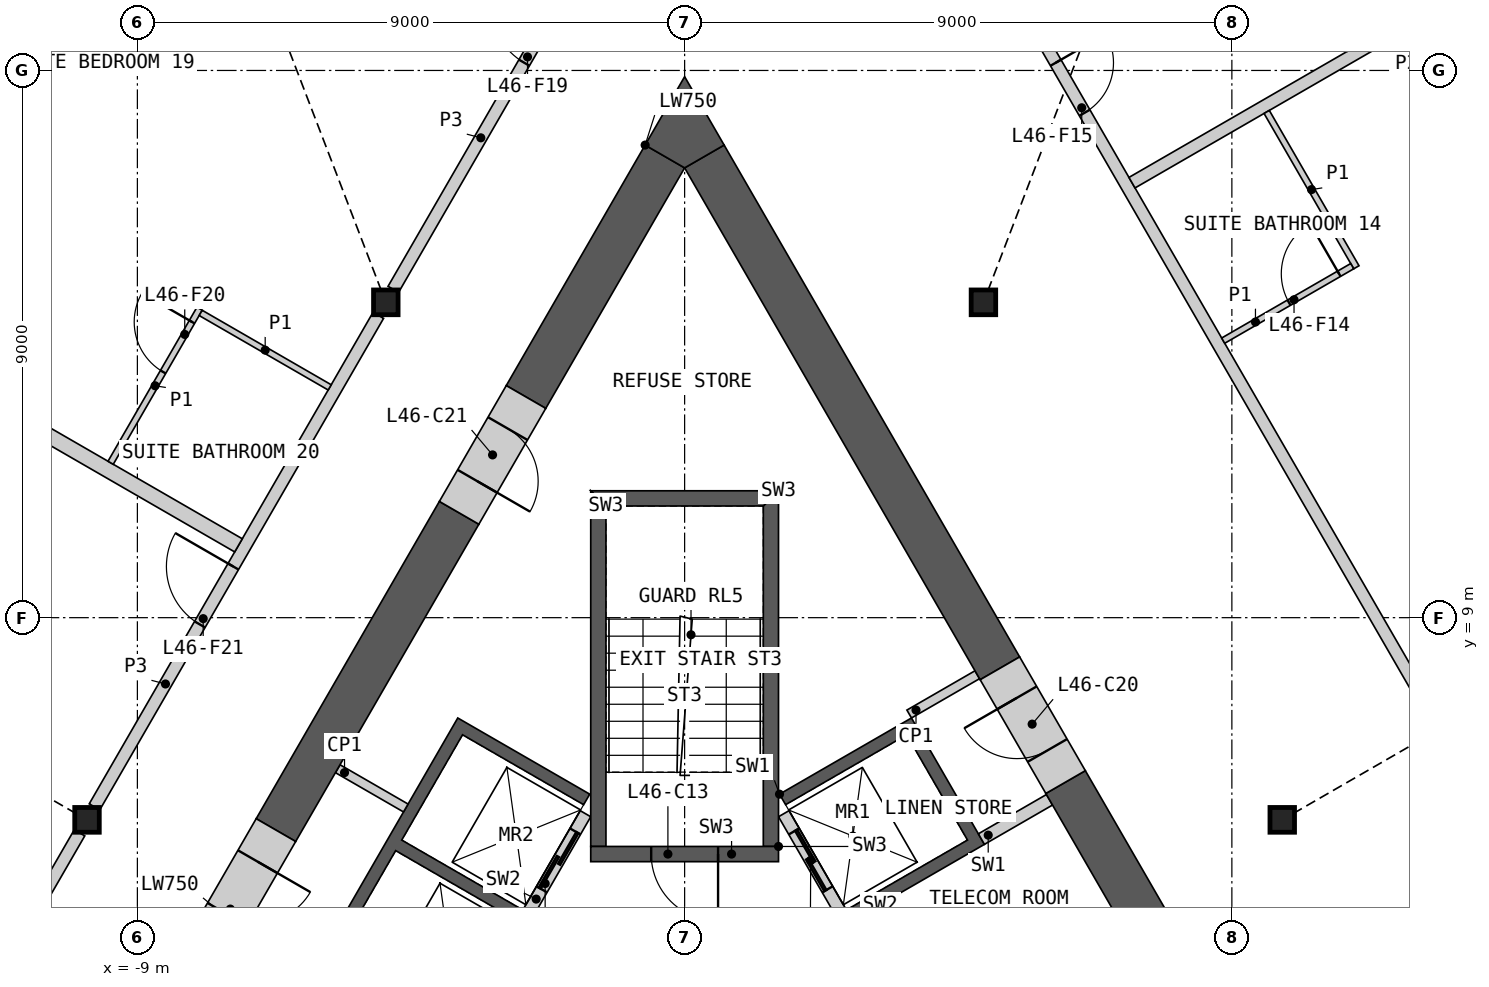
"""IFC4 building model, lengths in metres.
Left out: names, types, materials, properties, quantities, classifications, styles, units other than length and angle.
Written with IfcOpenShell. Run it as: python <this file> out.ifc"""

import sys

from ifc_helpers import new_model, si_unit, direction, frame, frame_2d, origin, origin_2d, place, context, subcontext, project, spatial, polyline, rectangle, i_section, outline, extrude, element, fill, save


model = new_model("IFC4")
c1 = context("Model", 3, precision=1e-05, world=origin(), true_north=direction((0.0, 1.0)))
c2 = subcontext(c1, "Body", "Model", "MODEL_VIEW")
j1 = project(units=[si_unit("LENGTHUNIT", "METRE"), si_unit("PLANEANGLEUNIT", "RADIAN")], contexts=[c1])
p1 = place(None, origin())
s1 = spatial("IfcSite", under=j1, at=p1, CompositionType="ELEMENT")
p2 = place(p1, origin())
s2 = spatial("IfcBuilding", under=s1, at=p2, CompositionType="ELEMENT")
p3 = place(p2, frame((0.0, 0.0, 208.8)))
s3 = spatial("IfcBuildingStorey", under=s2, at=p3, CompositionType="ELEMENT", Elevation=208.8)
for number, where, z_axis, x_axis in (
    (1, (-4.914, 14.186, 0.0), (0.0, 0.0, 1.0), (1.0, 0.0, 0.0)),
    (2, (-9.828, 5.675, 0.0), (0.0, 0.0, 1.0), (1.0, 0.0, 0.0)),
    (3, (9.828, 5.675, 0.0), (0.0, 0.0, 1.0), (1.0, 0.0, 0.0)),
    (4, (4.914, 14.186, 0.0), (0.0, 0.0, 1.0), (1.0, 0.0, 0.0)),
):
    element("IfcColumn", number, at=place(p3, frame(where, z_axis=z_axis, x_axis=x_axis)), inside=s3, PredefinedType="COLUMN", context=c2, shape_type="SweptSolid", body=[
        extrude(i_section(OverallWidth=0.404, OverallDepth=0.407, WebThickness=0.027, FlangeThickness=0.044, at=origin_2d()), origin(), (0.0, 0.0, 1.0), 3.6),
    ])
p4 = place(p3, origin())
e5 = element("IfcWall", 5, at=p4, inside=s3, PredefinedType="SHEAR", context=c2, shape_type="SweptSolid", body=[
    extrude(outline(polyline([(1.561, 6.097), (3.731, 7.35), (4.931, 5.272), (2.76, 4.019), (2.66, 4.192), (4.652, 5.342), (3.652, 7.074), (1.66, 5.924), (1.561, 6.097)])), origin(), (0.0, 0.0, 1.0), 3.25),
])
p5 = place(p3, frame((5.817, -1.476, 0.0), z_axis=(0.0, 0.0, 1.0), x_axis=(-0.500002616675, 0.866023893041, 0.0)))
e6 = element("IfcWall", 6, at=p5, inside=s3, PredefinedType="SOLIDWALL", context=c2, shape_type="SweptSolid", body=[
    extrude(rectangle(XDim=8.373, YDim=0.2, at=frame_2d((4.187, 0.0))), origin(), (0.0, 0.0, 1.0), 3.25),
])
p6 = place(p5, frame((1.537, 0.0, 0.0)))
e7 = element("IfcOpeningElement", 7, at=p6, cuts=e6, PredefinedType="OPENING", context=c2, shape_type="SweptSolid", body=[
    extrude(rectangle(XDim=0.9, YDim=2.1, at=frame_2d((0.45, 1.05))), frame((0.0, 0.11, 0.0), z_axis=(0.0, -1.0, 0.0), x_axis=(1.0, 0.0, 0.0)), (0.0, 0.0, 1.0), 0.22),
])
p7 = place(p5, frame((4.837, 0.0, 0.0)))
e8 = element("IfcOpeningElement", 8, at=p7, cuts=e6, PredefinedType="OPENING", context=c2, shape_type="SweptSolid", body=[
    extrude(rectangle(XDim=0.9, YDim=2.1, at=frame_2d((0.45, 1.05))), frame((0.0, 0.11, 0.0), z_axis=(0.0, -1.0, 0.0), x_axis=(1.0, 0.0, 0.0)), (0.0, 0.0, 1.0), 0.22),
])
p8 = place(p5, frame((6.937, 0.0, 0.0)))
e9 = element("IfcOpeningElement", 9, at=p8, cuts=e6, PredefinedType="OPENING", context=c2, shape_type="SweptSolid", body=[
    extrude(rectangle(XDim=1.1, YDim=2.1, at=frame_2d((0.55, 1.05))), frame((0.0, 0.11, 0.0), z_axis=(0.0, -1.0, 0.0), x_axis=(1.0, 0.0, 0.0)), (0.0, 0.0, 1.0), 0.22),
])
p9 = place(p3, frame((4.881, 5.358, 0.0), z_axis=(0.0, 0.0, 1.0), x_axis=(0.866084958089, 0.499896834728, 0.0)))
e10 = element("IfcWall", 10, at=p9, inside=s3, PredefinedType="SHEAR", context=c2, shape_type="SweptSolid", body=[
    extrude(rectangle(XDim=1.293, YDim=0.2, at=frame_2d((0.646, 0.0))), origin(), (0.0, 0.0, 1.0), 3.25),
])
p10 = place(p3, origin())
e11 = element("IfcWall", 11, at=p10, inside=s3, PredefinedType="SHEAR", context=c2, shape_type="SweptSolid", body=[
    extrude(outline(polyline([(-4.96, 0.208), (-7.131, 1.461), (-3.731, 7.35), (-1.561, 6.097), (-1.66, 5.924), (-3.652, 7.074), (-4.652, 5.342), (-2.66, 4.192), (-2.76, 4.019), (-4.752, 5.169), (-5.752, 3.437), (-3.76, 2.287), (-3.861, 2.113), (-5.852, 3.263), (-6.852, 1.531), (-4.861, 0.381), (-4.96, 0.208)])), origin(), (0.0, 0.0, 1.0), 3.25),
])
p11 = place(p3, frame((-1.631, 5.776, 0.0), z_axis=(0.0, 0.0, 1.0), x_axis=(-0.499992876559, -0.866029516466, 0.0)))
e12 = element("IfcWall", 12, at=p11, inside=s3, PredefinedType="SOLIDWALL", context=c2, shape_type="SweptSolid", body=[
    extrude(rectangle(XDim=6.486, YDim=0.2, at=frame_2d((3.243, 0.0))), origin(), (0.0, 0.0, 1.0), 3.25),
])
p12 = place(p11, frame((0.337, 0.0, 0.0)))
e13 = element("IfcOpeningElement", 13, at=p12, cuts=e12, PredefinedType="OPENING", context=c2, shape_type="SweptSolid", body=[
    extrude(rectangle(XDim=1.1, YDim=2.1, at=frame_2d((0.55, 1.05))), frame((0.0, 0.11, 0.0), z_axis=(0.0, -1.0, 0.0), x_axis=(1.0, 0.0, 0.0)), (0.0, 0.0, 1.0), 0.22),
])
p13 = place(p11, frame((2.537, 0.0, 0.0)))
e14 = element("IfcOpeningElement", 14, at=p13, cuts=e12, PredefinedType="OPENING", context=c2, shape_type="SweptSolid", body=[
    extrude(rectangle(XDim=1.1, YDim=2.1, at=frame_2d((0.55, 1.05))), frame((0.0, 0.11, 0.0), z_axis=(0.0, -1.0, 0.0), x_axis=(1.0, 0.0, 0.0)), (0.0, 0.0, 1.0), 0.22),
])
p14 = place(p3, origin())
e15 = element("IfcWall", 15, at=p14, inside=s3, PredefinedType="SHEAR", context=c2, shape_type="SweptSolid", body=[
    extrude(outline(polyline([(1.544, 5.237), (1.544, 11.087), (1.294, 10.837), (1.294, 5.237), (1.544, 5.237)])), origin(), (0.0, 0.0, 1.0), 3.25),
])
p15 = place(p3, origin())
e16 = element("IfcWall", 16, at=p15, inside=s3, PredefinedType="SHEAR", context=c2, shape_type="SweptSolid", body=[
    extrude(outline(polyline([(1.544, 11.087), (-1.544, 11.087), (-1.294, 10.837), (1.294, 10.837), (1.544, 11.087)])), origin(), (0.0, 0.0, 1.0), 3.25),
])
p16 = place(p3, origin())
e17 = element("IfcWall", 17, at=p16, inside=s3, PredefinedType="SHEAR", context=c2, shape_type="SweptSolid", body=[
    extrude(outline(polyline([(-1.294, 10.837), (-1.544, 11.087), (-1.544, 5.237), (-1.294, 5.237), (-1.294, 10.837)])), origin(), (0.0, 0.0, 1.0), 3.25),
])
p17 = place(p3, frame((1.544, 5.112, 0.0), z_axis=(0.0, 0.0, 1.0), x_axis=(-1.0, 0.0, 0.0)))
e18 = element("IfcWall", 18, at=p17, inside=s3, PredefinedType="SHEAR", context=c2, shape_type="SweptSolid", body=[
    extrude(rectangle(XDim=3.088, YDim=0.25, at=frame_2d((1.544, 0.0))), origin(), (0.0, 0.0, 1.0), 3.25),
])
p18 = place(p17, frame((0.994, 0.0, 0.0)))
e19 = element("IfcOpeningElement", 19, at=p18, cuts=e18, PredefinedType="OPENING", context=c2, shape_type="SweptSolid", body=[
    extrude(rectangle(XDim=1.1, YDim=2.1, at=frame_2d((0.55, 1.05))), frame((0.0, 0.135, 0.0), z_axis=(0.0, -1.0, 0.0), x_axis=(1.0, 0.0, 0.0)), (0.0, 0.0, 1.0), 0.27),
])
for number, where, z_axis, x_axis in (
    (20, (3.693, 7.415, 0.0), (0.0, 0.0, 1.0), (0.866, 0.5, 0.0)),
    (21, (-5.705, 6.516, 0.0), (0.0, 0.0, 1.0), (0.866, -0.5, 0.0)),
):
    element("IfcWall", number, at=place(p3, frame(where, z_axis=z_axis, x_axis=x_axis)), inside=s3, PredefinedType="PARTITIONING", context=c2, shape_type="SweptSolid", body=[
        extrude(rectangle(XDim=1.293, YDim=0.15, at=frame_2d((0.646, 0.0))), origin(), (0.0, 0.0, 1.0), 3.25),
    ])
p19 = place(p3, frame((5.185, 8.167, 0.0), z_axis=(0.0, 0.0, 1.0), x_axis=(-0.500004344816, 0.866022895289, 0.0)))
e22 = element("IfcWall", 22, at=p19, inside=s3, PredefinedType="SHEAR", context=c2, shape_type="SweptSolid", body=[
    extrude(rectangle(XDim=9.721, YDim=0.75, at=frame_2d((4.861, 0.0))), origin(), (0.0, 0.0, 1.0), 3.25),
])
p20 = place(p3, frame((8.025, 3.248, 0.0), z_axis=(0.0, 0.0, 1.0), x_axis=(-0.499958618571, 0.866049294045, 0.0)))
e23 = element("IfcWall", 23, at=p20, inside=s3, PredefinedType="SHEAR", context=c2, shape_type="SweptSolid", body=[
    extrude(rectangle(XDim=3.52, YDim=0.75, at=frame_2d((1.76, 0.0))), origin(), (0.0, 0.0, 1.0), 3.25),
])
p21 = place(p3, frame((-3.708, 10.724, 0.0), z_axis=(0.0, 0.0, 1.0), x_axis=(-0.500021737671, -0.866012853171, 0.0)))
e24 = element("IfcWall", 24, at=p21, inside=s3, PredefinedType="SHEAR", context=c2, shape_type="SweptSolid", body=[
    extrude(rectangle(XDim=6.026, YDim=0.75, at=frame_2d((3.013, 0.0))), origin(), (0.0, 0.0, 1.0), 3.25),
])
p22 = place(p3, frame((-0.325, 16.585, 0.0), z_axis=(0.0, 0.0, 1.0), x_axis=(-0.499984617099, -0.866034284924, 0.0)))
e25 = element("IfcWall", 25, at=p22, inside=s3, PredefinedType="SHEAR", context=c2, shape_type="SweptSolid", body=[
    extrude(rectangle(XDim=4.568, YDim=0.75, at=frame_2d((2.284, 0.0))), origin(), (0.0, 0.0, 1.0), 3.25),
])
p23 = place(p3, origin())
e26 = element("IfcWall", 26, at=p23, inside=s3, PredefinedType="SHEAR", context=c2, shape_type="SweptSolid", body=[
    extrude(outline(polyline([(-0.649, 16.773), (0.0, 17.898), (0.649, 16.773), (0.0, 16.398), (-0.649, 16.773)])), origin(), (0.0, 0.0, 1.0), 3.25),
])
p24 = place(p3, frame((-6.721, 5.506, 0.0), z_axis=(0.0, 0.0, 1.0), x_axis=(-0.499946605688, -0.86605622881, 0.0)))
e27 = element("IfcWall", 27, at=p24, inside=s3, PredefinedType="SHEAR", context=c2, shape_type="SweptSolid", body=[
    extrude(rectangle(XDim=2.2, YDim=0.75, at=frame_2d((1.1, 0.0))), origin(), (0.0, 0.0, 1.0), 3.25),
])
p25 = place(p24, frame((0.6, 0.0, 0.0)))
e28 = element("IfcOpeningElement", 28, at=p25, cuts=e27, PredefinedType="OPENING", context=c2, shape_type="SweptSolid", body=[
    extrude(rectangle(XDim=1.0, YDim=2.1, at=frame_2d((0.5, 1.05))), frame((0.0, 0.385, 0.0), z_axis=(0.0, -1.0, 0.0), x_axis=(1.0, 0.0, 0.0)), (0.0, 0.0, 1.0), 0.77),
])
p26 = place(p3, frame((6.265, 6.296, 0.0), z_axis=(0.0, 0.0, 1.0), x_axis=(-0.500029011134, 0.866008653551, 0.0)))
e29 = element("IfcWall", 29, at=p26, inside=s3, PredefinedType="SHEAR", context=c2, shape_type="SweptSolid", body=[
    extrude(rectangle(XDim=2.16, YDim=0.75, at=frame_2d((1.08, 0.0))), origin(), (0.0, 0.0, 1.0), 3.25),
])
p27 = place(p26, frame((0.6, 0.0, 0.0)))
e30 = element("IfcOpeningElement", 30, at=p27, cuts=e29, PredefinedType="OPENING", context=c2, shape_type="SweptSolid", body=[
    extrude(rectangle(XDim=1.0, YDim=2.1, at=frame_2d((0.5, 1.05))), frame((0.0, 0.385, 0.0), z_axis=(0.0, -1.0, 0.0), x_axis=(1.0, 0.0, 0.0)), (0.0, 0.0, 1.0), 0.77),
])
p28 = place(p3, frame((-2.609, 12.629, 0.0), z_axis=(0.0, 0.0, 1.0), x_axis=(-0.500077893725, -0.86598042715, 0.0)))
e31 = element("IfcWall", 31, at=p28, inside=s3, PredefinedType="SHEAR", context=c2, shape_type="SweptSolid", body=[
    extrude(rectangle(XDim=2.2, YDim=0.75, at=frame_2d((1.1, 0.0))), origin(), (0.0, 0.0, 1.0), 3.25),
])
p29 = place(p28, frame((0.6, 0.0, 0.0)))
e32 = element("IfcOpeningElement", 32, at=p29, cuts=e31, PredefinedType="OPENING", context=c2, shape_type="SweptSolid", body=[
    extrude(rectangle(XDim=1.0, YDim=2.1, at=frame_2d((0.5, 1.05))), frame((0.0, 0.385, 0.0), z_axis=(0.0, -1.0, 0.0), x_axis=(1.0, 0.0, 0.0)), (0.0, 0.0, 1.0), 0.77),
])
p30 = place(p3, frame((5.377, 19.385, 0.0), z_axis=(0.0, 0.0, 1.0), x_axis=(0.500000757641, -0.86602496636, 0.0)))
e33 = element("IfcWall", 33, at=p30, inside=s3, PredefinedType="PARTITIONING", context=c2, shape_type="SweptSolid", body=[
    extrude(rectangle(XDim=28.198, YDim=0.2, at=frame_2d((14.099, 0.0))), origin(), (0.0, 0.0, 1.0), 3.25),
])
p31 = place(p30, frame((25.345, 0.0, 0.0)))
e34 = element("IfcOpeningElement", 34, at=p31, cuts=e33, PredefinedType="OPENING", context=c2, shape_type="SweptSolid", body=[
    extrude(rectangle(XDim=1.8, YDim=2.1, at=frame_2d((0.9, 1.05))), frame((0.0, 0.11, 0.0), z_axis=(0.0, -1.0, 0.0), x_axis=(1.0, 0.0, 0.0)), (0.0, 0.0, 1.0), 0.22),
])
p32 = place(p30, frame((19.621, 0.0, 0.0)))
e35 = element("IfcOpeningElement", 35, at=p32, cuts=e33, PredefinedType="OPENING", context=c2, shape_type="SweptSolid", body=[
    extrude(rectangle(XDim=1.0, YDim=2.1, at=frame_2d((0.5, 1.05))), frame((0.0, 0.11, 0.0), z_axis=(0.0, -1.0, 0.0), x_axis=(1.0, 0.0, 0.0)), (0.0, 0.0, 1.0), 0.22),
])
p33 = place(p30, frame((16.409, 0.0, 0.0)))
e36 = element("IfcOpeningElement", 36, at=p33, cuts=e33, PredefinedType="OPENING", context=c2, shape_type="SweptSolid", body=[
    extrude(rectangle(XDim=1.1, YDim=2.1, at=frame_2d((0.55, 1.05))), frame((0.0, 0.11, 0.0), z_axis=(0.0, -1.0, 0.0), x_axis=(1.0, 0.0, 0.0)), (0.0, 0.0, 1.0), 0.22),
])
p34 = place(p30, frame((1.452, 0.0, 0.0)))
e37 = element("IfcOpeningElement", 37, at=p34, cuts=e33, PredefinedType="OPENING", context=c2, shape_type="SweptSolid", body=[
    extrude(rectangle(XDim=0.95, YDim=2.1, at=frame_2d((0.475, 1.05))), frame((0.0, 0.11, 0.0), z_axis=(0.0, -1.0, 0.0), x_axis=(1.0, 0.0, 0.0)), (0.0, 0.0, 1.0), 0.22),
])
p35 = place(p3, frame((-9.705, 5.888, 0.0), z_axis=(0.0, 0.0, 1.0), x_axis=(0.50000393355, 0.866023132736, 0.0)))
e38 = element("IfcWall", 38, at=p35, inside=s3, PredefinedType="PARTITIONING", context=c2, shape_type="SweptSolid", body=[
    extrude(rectangle(XDim=9.335, YDim=0.2, at=frame_2d((4.667, 0.0))), origin(), (0.0, 0.0, 1.0), 3.25),
])
p36 = place(p35, frame((3.465, 0.0, 0.0)))
e39 = element("IfcOpeningElement", 39, at=p36, cuts=e38, PredefinedType="OPENING", context=c2, shape_type="SweptSolid", body=[
    extrude(rectangle(XDim=1.1, YDim=2.1, at=frame_2d((0.55, 1.05))), frame((0.0, 0.11, 0.0), z_axis=(0.0, -1.0, 0.0), x_axis=(1.0, 0.0, 0.0)), (0.0, 0.0, 1.0), 0.22),
])
p37 = place(p3, frame((-14.619, -2.624, 0.0), z_axis=(0.0, 0.0, 1.0), x_axis=(0.50000393355, 0.866023132736, 0.0)))
e40 = element("IfcWall", 40, at=p37, inside=s3, PredefinedType="PARTITIONING", context=c2, shape_type="SweptSolid", body=[
    extrude(rectangle(XDim=9.335, YDim=0.2, at=frame_2d((4.667, 0.0))), origin(), (0.0, 0.0, 1.0), 3.25),
])
p38 = place(p37, frame((3.062, 0.0, 0.0)))
e41 = element("IfcOpeningElement", 41, at=p38, cuts=e40, PredefinedType="OPENING", context=c2, shape_type="SweptSolid", body=[
    extrude(rectangle(XDim=1.0, YDim=2.1, at=frame_2d((0.5, 1.05))), frame((0.0, 0.11, 0.0), z_axis=(0.0, -1.0, 0.0), x_axis=(1.0, 0.0, 0.0)), (0.0, 0.0, 1.0), 0.22),
])
p39 = place(p3, frame((-14.39, 14.261, 0.0), z_axis=(0.0, 0.0, 1.0), x_axis=(0.86603182394, -0.4999888798, 0.0)))
e42 = element("IfcWall", 42, at=p39, inside=s3, PredefinedType="PARTITIONING", context=c2, shape_type="SweptSolid", body=[
    extrude(rectangle(XDim=8.144, YDim=0.25, at=frame_2d((4.072, 0.0))), origin(), (0.0, 0.0, 1.0), 2.404),
])
p40 = place(p3, frame((-4.791, 14.4, 0.0), z_axis=(0.0, 0.0, 1.0), x_axis=(0.50000762079, 0.866021003874, 0.0)))
e43 = element("IfcWall", 43, at=p40, inside=s3, PredefinedType="PARTITIONING", context=c2, shape_type="SweptSolid", body=[
    extrude(rectangle(XDim=5.756, YDim=0.2, at=frame_2d((2.878, 0.0))), origin(), (0.0, 0.0, 1.0), 3.25),
])
p41 = place(p40, frame((4.304, 0.0, 0.0)))
e44 = element("IfcOpeningElement", 44, at=p41, cuts=e43, PredefinedType="OPENING", context=c2, shape_type="SweptSolid", body=[
    extrude(rectangle(XDim=1.1, YDim=2.1, at=frame_2d((0.55, 1.05))), frame((0.0, 0.11, 0.0), z_axis=(0.0, -1.0, 0.0), x_axis=(1.0, 0.0, 0.0)), (0.0, 0.0, 1.0), 0.22),
])
p42 = place(p3, frame((7.357, 16.154, 0.0), z_axis=(0.0, 0.0, 1.0), x_axis=(0.866029004385, 0.499993763526, 0.0)))
e45 = element("IfcWall", 45, at=p42, inside=s3, PredefinedType="PARTITIONING", context=c2, shape_type="SweptSolid", body=[
    extrude(rectangle(XDim=9.789, YDim=0.2, at=frame_2d((4.895, 0.0))), origin(), (0.0, 0.0, 1.0), 2.404),
])
p43 = place(p3, frame((9.573, 17.318, 0.0), z_axis=(0.0, 0.0, 1.0), x_axis=(0.500037662692, -0.866003658127, 0.0)))
e46 = element("IfcWall", 46, at=p43, inside=s3, PredefinedType="PARTITIONING", context=c2, shape_type="SweptSolid", body=[
    extrude(rectangle(XDim=2.95, YDim=0.1, at=frame_2d((1.475, 0.0))), origin(), (0.0, 0.0, 1.0), 2.404),
])
p44 = place(p3, frame((-9.44, 11.548, 0.0), z_axis=(0.0, 0.0, 1.0), x_axis=(0.499963291492, 0.866046596414, 0.0)))
e47 = element("IfcWall", 47, at=p44, inside=s3, PredefinedType="PARTITIONING", context=c2, shape_type="SweptSolid", body=[
    extrude(rectangle(XDim=2.925, YDim=0.1, at=frame_2d((1.462, 0.0))), origin(), (0.0, 0.0, 1.0), 2.404),
])
p45 = place(p44, frame((1.725, 0.0, 0.0)))
e48 = element("IfcOpeningElement", 48, at=p45, cuts=e47, PredefinedType="OPENING", context=c2, shape_type="SweptSolid", body=[
    extrude(rectangle(XDim=0.95, YDim=2.1, at=frame_2d((0.475, 1.05))), frame((0.0, 0.06, 0.0), z_axis=(0.0, -1.0, 0.0), x_axis=(1.0, 0.0, 0.0)), (0.0, 0.0, 1.0), 0.12),
])
p46 = place(p3, frame((8.857, 13.556, 0.0), z_axis=(0.0, 0.0, 1.0), x_axis=(0.866014668023, 0.500018594424, 0.0)))
e49 = element("IfcWall", 49, at=p46, inside=s3, PredefinedType="PARTITIONING", context=c2, shape_type="SweptSolid", body=[
    extrude(rectangle(XDim=2.45, YDim=0.1, at=frame_2d((1.225, 0.0))), origin(), (0.0, 0.0, 1.0), 2.404),
])
p47 = place(p46, frame((1.25, 0.0, 0.0)))
e50 = element("IfcOpeningElement", 50, at=p47, cuts=e49, PredefinedType="OPENING", context=c2, shape_type="SweptSolid", body=[
    extrude(rectangle(XDim=0.95, YDim=2.1, at=frame_2d((0.475, 1.05))), frame((0.0, 0.06, 0.0), z_axis=(0.0, -1.0, 0.0), x_axis=(1.0, 0.0, 0.0)), (0.0, 0.0, 1.0), 0.12),
])
p48 = place(p3, frame((-7.959, 14.012, 0.0), z_axis=(0.0, 0.0, 1.0), x_axis=(0.866057815567, -0.499943856944, 0.0)))
e51 = element("IfcWall", 51, at=p48, inside=s3, PredefinedType="PARTITIONING", context=c2, shape_type="SweptSolid", body=[
    extrude(rectangle(XDim=2.45, YDim=0.1, at=frame_2d((1.225, 0.0))), origin(), (0.0, 0.0, 1.0), 2.404),
])
p49 = place(p8, origin())
e52 = element("IfcDoor", 52, at=p49, inside=s3, OperationType="SLIDING_TO_LEFT", PredefinedType="DOOR", context=c2, shape_type="SweptSolid", body=[
    extrude(rectangle(XDim=1.1, YDim=2.1, at=frame_2d((0.55, 1.05))), frame((0.0, 0.025, 0.0), z_axis=(0.0, -1.0, 0.0), x_axis=(1.0, 0.0, 0.0)), (0.0, 0.0, 1.0), 0.05),
])
fill(e9, e52)
p50 = place(p12, origin())
e53 = element("IfcDoor", 53, at=p50, inside=s3, OperationType="SLIDING_TO_LEFT", PredefinedType="DOOR", context=c2, shape_type="SweptSolid", body=[
    extrude(rectangle(XDim=1.1, YDim=2.1, at=frame_2d((0.55, 1.05))), frame((0.0, 0.025, 0.0), z_axis=(0.0, -1.0, 0.0), x_axis=(1.0, 0.0, 0.0)), (0.0, 0.0, 1.0), 0.05),
])
fill(e13, e53)
p51 = place(p18, origin())
e54 = element("IfcDoor", 54, at=p51, inside=s3, OperationType="SINGLE_SWING_LEFT", PredefinedType="DOOR", context=c2, shape_type="SweptSolid", body=[
    extrude(rectangle(XDim=1.1, YDim=2.1, at=frame_2d((0.55, 1.05))), frame((0.0, 0.025, 0.0), z_axis=(0.0, -1.0, 0.0), x_axis=(1.0, 0.0, 0.0)), (0.0, 0.0, 1.0), 0.05),
])
fill(e19, e54)
p52 = place(p25, origin())
e55 = element("IfcDoor", 55, at=p52, inside=s3, OperationType="SINGLE_SWING_LEFT", PredefinedType="DOOR", context=c2, shape_type="SweptSolid", body=[
    extrude(rectangle(XDim=1.0, YDim=2.1, at=frame_2d((0.5, 1.05))), frame((0.0, 0.13, 0.0), z_axis=(0.0, -1.0, 0.0), x_axis=(1.0, 0.0, 0.0)), (0.0, 0.0, 1.0), 0.05),
])
fill(e28, e55)
p53 = place(p27, origin())
e56 = element("IfcDoor", 56, at=p53, inside=s3, OperationType="SINGLE_SWING_RIGHT", PredefinedType="DOOR", context=c2, shape_type="SweptSolid", body=[
    extrude(rectangle(XDim=1.0, YDim=2.1, at=frame_2d((0.5, 1.05))), frame((0.0, 0.13, 0.0), z_axis=(0.0, -1.0, 0.0), x_axis=(1.0, 0.0, 0.0)), (0.0, 0.0, 1.0), 0.05),
])
fill(e30, e56)
p54 = place(p29, origin())
e57 = element("IfcDoor", 57, at=p54, inside=s3, OperationType="SINGLE_SWING_RIGHT", PredefinedType="DOOR", context=c2, shape_type="SweptSolid", body=[
    extrude(rectangle(XDim=1.0, YDim=2.1, at=frame_2d((0.5, 1.05))), frame((0.0, 0.13, 0.0), z_axis=(0.0, -1.0, 0.0), x_axis=(1.0, 0.0, 0.0)), (0.0, 0.0, 1.0), 0.05),
])
fill(e32, e57)
p55 = place(p47, origin())
e58 = element("IfcDoor", 58, at=p55, inside=s3, OperationType="SINGLE_SWING_RIGHT", PredefinedType="DOOR", context=c2, shape_type="SweptSolid", body=[
    extrude(rectangle(XDim=0.95, YDim=2.1, at=frame_2d((0.475, 1.05))), frame((0.0, 0.025, 0.0), z_axis=(0.0, -1.0, 0.0), x_axis=(1.0, 0.0, 0.0)), (0.0, 0.0, 1.0), 0.05),
])
fill(e50, e58)
p56 = place(p34, origin())
e59 = element("IfcDoor", 59, at=p56, inside=s3, OperationType="SINGLE_SWING_LEFT", PredefinedType="DOOR", context=c2, shape_type="SweptSolid", body=[
    extrude(rectangle(XDim=0.95, YDim=2.1, at=frame_2d((0.475, 1.05))), frame((0.0, 0.025, 0.0), z_axis=(0.0, -1.0, 0.0), x_axis=(1.0, 0.0, 0.0)), (0.0, 0.0, 1.0), 0.05),
])
fill(e37, e59)
p57 = place(p41, origin())
e60 = element("IfcDoor", 60, at=p57, inside=s3, OperationType="SINGLE_SWING_RIGHT", PredefinedType="DOOR", context=c2, shape_type="SweptSolid", body=[
    extrude(rectangle(XDim=1.1, YDim=2.1, at=frame_2d((0.55, 1.05))), frame((0.0, 0.025, 0.0), z_axis=(0.0, -1.0, 0.0), x_axis=(1.0, 0.0, 0.0)), (0.0, 0.0, 1.0), 0.05),
])
fill(e44, e60)
p58 = place(p45, origin())
e61 = element("IfcDoor", 61, at=p58, inside=s3, OperationType="SINGLE_SWING_RIGHT", PredefinedType="DOOR", context=c2, shape_type="SweptSolid", body=[
    extrude(rectangle(XDim=0.95, YDim=2.1, at=frame_2d((0.475, 1.05))), frame((0.0, 0.025, 0.0), z_axis=(0.0, -1.0, 0.0), x_axis=(1.0, 0.0, 0.0)), (0.0, 0.0, 1.0), 0.05),
])
fill(e48, e61)
p59 = place(p36, origin())
e62 = element("IfcDoor", 62, at=p59, inside=s3, OperationType="SINGLE_SWING_RIGHT", PredefinedType="DOOR", context=c2, shape_type="SweptSolid", body=[
    extrude(rectangle(XDim=1.1, YDim=2.1, at=frame_2d((0.55, 1.05))), frame((0.0, 0.025, 0.0), z_axis=(0.0, -1.0, 0.0), x_axis=(1.0, 0.0, 0.0)), (0.0, 0.0, 1.0), 0.05),
])
fill(e39, e62)
save(model, sys.argv[1])
